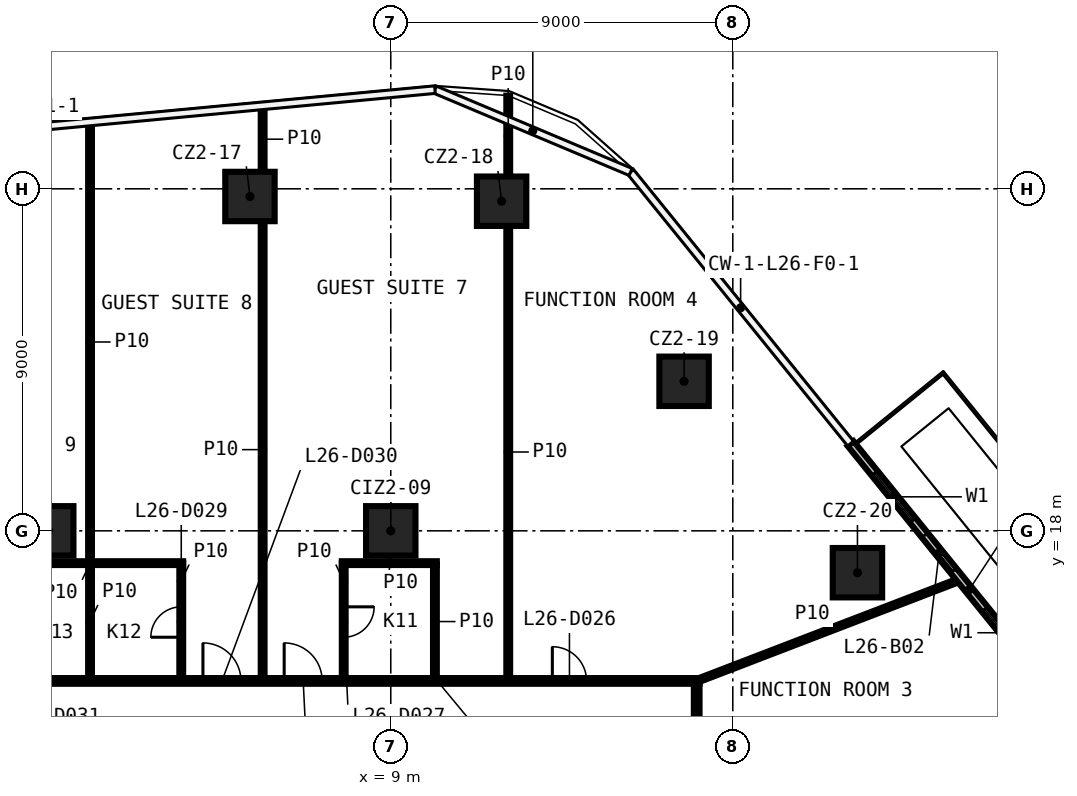
"""IFC4 building model, lengths in metres.
Left out: names, types, materials, properties, quantities, classifications, styles, units other than length and angle.
Written with IfcOpenShell. Run it as: python <this file> out.ifc"""

import sys

from ifc_helpers import new_model, si_unit, direction, frame, frame_2d, origin, origin_2d, place, context, subcontext, project, spatial, rectangle, extrude, element, fill, save


model = new_model("IFC4")
c1 = context("Model", 3, precision=1e-05, world=origin(), true_north=direction((0.0, 1.0)))
c2 = subcontext(c1, "Body", "Model", "MODEL_VIEW")
j1 = project(units=[si_unit("LENGTHUNIT", "METRE"), si_unit("PLANEANGLEUNIT", "RADIAN")], contexts=[c1])
p1 = place(None, origin())
s1 = spatial("IfcSite", under=j1, at=p1, CompositionType="ELEMENT")
p2 = place(p1, origin())
s2 = spatial("IfcBuilding", under=s1, at=p2, CompositionType="ELEMENT")
p3 = place(p2, frame((0.0, 0.0, 121.1)))
s3 = spatial("IfcBuildingStorey", under=s2, at=p3, CompositionType="ELEMENT", Elevation=121.1)
for number, where, z_axis, x_axis in (
    (1, (5.295, 26.798, 0.0), (0.0, 0.0, 1.0), (1.0, 0.0, 0.0)),
    (2, (11.917, 26.674, 0.0), (0.0, 0.0, 1.0), (1.0, 0.0, 0.0)),
    (3, (16.718, 21.935, 0.0), (0.0, 0.0, 1.0), (1.0, 0.0, 0.0)),
    (4, (21.28, 16.898, 0.0), (0.0, 0.0, 1.0), (1.0, 0.0, 0.0)),
    (5, (0.0, 18.0, 0.0), (0.0, 0.0, 1.0), (1.0, 0.0, 0.0)),
    (6, (9.0, 18.0, 0.0), (0.0, 0.0, 1.0), (1.0, 0.0, 0.0)),
):
    element("IfcColumn", number, at=place(p3, frame(where, z_axis=z_axis, x_axis=x_axis)), inside=s3, PredefinedType="COLUMN", context=c2, shape_type="SweptSolid", body=[
        extrude(rectangle(XDim=1.3, YDim=1.3, at=origin_2d()), origin(), (0.0, 0.0, 1.0), 3.3),
    ])
p4 = place(p3, frame((-17.125, 14.05, 0.0), z_axis=(0.0, 0.0, 1.0), x_axis=(1.0, 0.0, 0.0)))
e7 = element("IfcWall", 7, at=p4, inside=s3, PredefinedType="PARTITIONING", context=c2, shape_type="SweptSolid", body=[
    extrude(rectangle(XDim=34.25, YDim=0.15, at=frame_2d((17.125, 0.0))), origin(), (0.0, 0.0, 1.0), 3.3),
])
p5 = place(p4, frame((30.377, 0.0, 0.0)))
e8 = element("IfcOpeningElement", 8, at=p5, cuts=e7, PredefinedType="OPENING", context=c2, shape_type="SweptSolid", body=[
    extrude(rectangle(XDim=0.9, YDim=2.1, at=frame_2d((0.45, 1.05))), frame((0.0, 0.085, 0.0), z_axis=(0.0, -1.0, 0.0), x_axis=(1.0, 0.0, 0.0)), (0.0, 0.0, 1.0), 0.17),
])
p6 = place(p4, frame((23.321, 0.0, 0.0)))
e9 = element("IfcOpeningElement", 9, at=p6, cuts=e7, PredefinedType="OPENING", context=c2, shape_type="SweptSolid", body=[
    extrude(rectangle(XDim=1.0, YDim=2.1, at=frame_2d((0.5, 1.05))), frame((0.0, 0.085, 0.0), z_axis=(0.0, -1.0, 0.0), x_axis=(1.0, 0.0, 0.0)), (0.0, 0.0, 1.0), 0.17),
])
p7 = place(p4, frame((21.183, 0.0, 0.0)))
e10 = element("IfcOpeningElement", 10, at=p7, cuts=e7, PredefinedType="OPENING", context=c2, shape_type="SweptSolid", body=[
    extrude(rectangle(XDim=1.0, YDim=2.1, at=frame_2d((0.5, 1.05))), frame((0.0, 0.085, 0.0), z_axis=(0.0, -1.0, 0.0), x_axis=(1.0, 0.0, 0.0)), (0.0, 0.0, 1.0), 0.17),
])
p8 = place(p4, frame((14.241, 0.0, 0.0)))
e11 = element("IfcOpeningElement", 11, at=p8, cuts=e7, PredefinedType="OPENING", context=c2, shape_type="SweptSolid", body=[
    extrude(rectangle(XDim=1.0, YDim=2.1, at=frame_2d((0.5, 1.05))), frame((0.0, 0.085, 0.0), z_axis=(0.0, -1.0, 0.0), x_axis=(1.0, 0.0, 0.0)), (0.0, 0.0, 1.0), 0.17),
])
p9 = place(p4, frame((12.099, 0.0, 0.0)))
e12 = element("IfcOpeningElement", 12, at=p9, cuts=e7, PredefinedType="OPENING", context=c2, shape_type="SweptSolid", body=[
    extrude(rectangle(XDim=1.0, YDim=2.1, at=frame_2d((0.5, 1.05))), frame((0.0, 0.085, 0.0), z_axis=(0.0, -1.0, 0.0), x_axis=(1.0, 0.0, 0.0)), (0.0, 0.0, 1.0), 0.17),
])
p10 = place(p4, frame((5.161, 0.0, 0.0)))
e13 = element("IfcOpeningElement", 13, at=p10, cuts=e7, PredefinedType="OPENING", context=c2, shape_type="SweptSolid", body=[
    extrude(rectangle(XDim=1.0, YDim=2.1, at=frame_2d((0.5, 1.05))), frame((0.0, 0.085, 0.0), z_axis=(0.0, -1.0, 0.0), x_axis=(1.0, 0.0, 0.0)), (0.0, 0.0, 1.0), 0.17),
])
p11 = place(p4, frame((2.406, 0.0, 0.0)))
e14 = element("IfcOpeningElement", 14, at=p11, cuts=e7, PredefinedType="OPENING", context=c2, shape_type="SweptSolid", body=[
    extrude(rectangle(XDim=0.9, YDim=2.1, at=frame_2d((0.45, 1.05))), frame((0.0, 0.085, 0.0), z_axis=(0.0, -1.0, 0.0), x_axis=(1.0, 0.0, 0.0)), (0.0, 0.0, 1.0), 0.17),
])
p12 = place(p3, frame((-1.363, 17.15, 0.0), z_axis=(0.0, 0.0, 1.0), x_axis=(1.0, 0.0, 0.0)))
e15 = element("IfcWall", 15, at=p12, inside=s3, PredefinedType="PARTITIONING", context=c2, shape_type="SweptSolid", body=[
    extrude(rectangle(XDim=4.9, YDim=0.1, at=frame_2d((2.45, 0.0))), origin(), (0.0, 0.0, 1.0), 3.3),
])
p13 = place(p3, frame((7.712, 17.15, 0.0), z_axis=(0.0, 0.0, 1.0), x_axis=(1.0, 0.0, 0.0)))
e16 = element("IfcWall", 16, at=p13, inside=s3, PredefinedType="PARTITIONING", context=c2, shape_type="SweptSolid", body=[
    extrude(rectangle(XDim=2.5, YDim=0.1, at=frame_2d((1.25, 0.0))), origin(), (0.0, 0.0, 1.0), 3.3),
])
p14 = place(p3, frame((17.05, 14.05, 0.0), z_axis=(0.0, 0.0, 1.0), x_axis=(0.933461735893, 0.358676996228, 0.0)))
e17 = element("IfcWall", 17, at=p14, inside=s3, PredefinedType="PARTITIONING", context=c2, shape_type="SweptSolid", body=[
    extrude(rectangle(XDim=7.42, YDim=0.1, at=frame_2d((3.71, 0.0))), origin(), (0.0, 0.0, 1.0), 3.3),
])
p15 = place(p3, frame((17.05, 13.975, 0.0), z_axis=(0.0, 0.0, 1.0), x_axis=(0.0, -1.0, 0.0)))
e18 = element("IfcWall", 18, at=p15, inside=s3, PredefinedType="PARTITIONING", context=c2, shape_type="SweptSolid", body=[
    extrude(rectangle(XDim=27.95, YDim=0.15, at=frame_2d((13.975, 0.0))), origin(), (0.0, 0.0, 1.0), 3.3),
])
p16 = place(p15, frame((25.545, 0.0, 0.0)))
e19 = element("IfcOpeningElement", 19, at=p16, cuts=e18, PredefinedType="OPENING", context=c2, shape_type="SweptSolid", body=[
    extrude(rectangle(XDim=1.0, YDim=2.1, at=frame_2d((0.5, 1.05))), frame((0.0, 0.085, 0.0), z_axis=(0.0, -1.0, 0.0), x_axis=(1.0, 0.0, 0.0)), (0.0, 0.0, 1.0), 0.17),
])
p17 = place(p15, frame((19.024, 0.0, 0.0)))
e20 = element("IfcOpeningElement", 20, at=p17, cuts=e18, PredefinedType="OPENING", context=c2, shape_type="SweptSolid", body=[
    extrude(rectangle(XDim=1.0, YDim=2.1, at=frame_2d((0.5, 1.05))), frame((0.0, 0.085, 0.0), z_axis=(0.0, -1.0, 0.0), x_axis=(1.0, 0.0, 0.0)), (0.0, 0.0, 1.0), 0.17),
])
p18 = place(p15, frame((17.303, 0.0, 0.0)))
e21 = element("IfcOpeningElement", 21, at=p18, cuts=e18, PredefinedType="OPENING", context=c2, shape_type="SweptSolid", body=[
    extrude(rectangle(XDim=1.0, YDim=2.1, at=frame_2d((0.5, 1.05))), frame((0.0, 0.085, 0.0), z_axis=(0.0, -1.0, 0.0), x_axis=(1.0, 0.0, 0.0)), (0.0, 0.0, 1.0), 0.17),
])
p19 = place(p15, frame((11.155, 0.0, 0.0)))
e22 = element("IfcOpeningElement", 22, at=p19, cuts=e18, PredefinedType="OPENING", context=c2, shape_type="SweptSolid", body=[
    extrude(rectangle(XDim=0.9, YDim=2.1, at=frame_2d((0.45, 1.05))), frame((0.0, 0.085, 0.0), z_axis=(0.0, -1.0, 0.0), x_axis=(1.0, 0.0, 0.0)), (0.0, 0.0, 1.0), 0.17),
])
p20 = place(p15, frame((7.145, 0.0, 0.0)))
e23 = element("IfcOpeningElement", 23, at=p20, cuts=e18, PredefinedType="OPENING", context=c2, shape_type="SweptSolid", body=[
    extrude(rectangle(XDim=0.9, YDim=2.1, at=frame_2d((0.45, 1.05))), frame((0.0, 0.085, 0.0), z_axis=(0.0, -1.0, 0.0), x_axis=(1.0, 0.0, 0.0)), (0.0, 0.0, 1.0), 0.17),
])
p21 = place(p15, frame((2.168, 0.0, 0.0)))
e24 = element("IfcOpeningElement", 24, at=p21, cuts=e18, PredefinedType="OPENING", context=c2, shape_type="SweptSolid", body=[
    extrude(rectangle(XDim=0.9, YDim=2.1, at=frame_2d((0.45, 1.05))), frame((0.0, 0.085, 0.0), z_axis=(0.0, -1.0, 0.0), x_axis=(1.0, 0.0, 0.0)), (0.0, 0.0, 1.0), 0.17),
])
p22 = place(p3, frame((12.091, 14.125, 0.0), z_axis=(0.0, 0.0, 1.0), x_axis=(0.0, 1.0, 0.0)))
e25 = element("IfcWall", 25, at=p22, inside=s3, PredefinedType="PARTITIONING", context=c2, shape_type="SweptSolid", body=[
    extrude(rectangle(XDim=11.899, YDim=0.1, at=frame_2d((5.949, 0.0))), origin(), (0.0, 0.0, 1.0), 3.3),
])
p23 = place(p3, frame((12.091, 27.324, 0.0), z_axis=(0.0, 0.0, 1.0), x_axis=(0.0, 1.0, 0.0)))
e26 = element("IfcWall", 26, at=p23, inside=s3, PredefinedType="PARTITIONING", context=c2, shape_type="SweptSolid", body=[
    extrude(rectangle(XDim=2.128, YDim=0.1, at=frame_2d((1.064, 0.0))), origin(), (0.0, 0.0, 1.0), 3.3),
])
p24 = place(p3, frame((10.162, 14.125, 0.0), z_axis=(0.0, 0.0, 1.0), x_axis=(0.0, 1.0, 0.0)))
e27 = element("IfcWall", 27, at=p24, inside=s3, PredefinedType="PARTITIONING", context=c2, shape_type="SweptSolid", body=[
    extrude(rectangle(XDim=2.975, YDim=0.1, at=frame_2d((1.488, 0.0))), origin(), (0.0, 0.0, 1.0), 3.3),
])
p25 = place(p3, frame((7.762, 17.15, 0.0), z_axis=(0.0, 0.0, 1.0), x_axis=(0.0, -1.0, 0.0)))
e28 = element("IfcWall", 28, at=p25, inside=s3, PredefinedType="PARTITIONING", context=c2, shape_type="SweptSolid", body=[
    extrude(rectangle(XDim=3.025, YDim=0.1, at=frame_2d((1.512, 0.0))), origin(), (0.0, 0.0, 1.0), 3.3),
])
p26 = place(p25, frame((1.15, 0.0, 0.0)))
e29 = element("IfcOpeningElement", 29, at=p26, cuts=e28, PredefinedType="OPENING", context=c2, shape_type="SweptSolid", body=[
    extrude(rectangle(XDim=0.8, YDim=2.1, at=frame_2d((0.4, 1.05))), frame((0.0, 0.06, 0.0), z_axis=(0.0, -1.0, 0.0), x_axis=(1.0, 0.0, 0.0)), (0.0, 0.0, 1.0), 0.12),
])
p27 = place(p3, frame((5.629, 14.125, 0.0), z_axis=(0.0, 0.0, 1.0), x_axis=(0.0, 1.0, 0.0)))
e30 = element("IfcWall", 30, at=p27, inside=s3, PredefinedType="PARTITIONING", context=c2, shape_type="SweptSolid", body=[
    extrude(rectangle(XDim=12.023, YDim=0.1, at=frame_2d((6.011, 0.0))), origin(), (0.0, 0.0, 1.0), 3.3),
])
p28 = place(p3, frame((5.629, 27.448, 0.0), z_axis=(0.0, 0.0, 1.0), x_axis=(0.0, 1.0, 0.0)))
e31 = element("IfcWall", 31, at=p28, inside=s3, PredefinedType="PARTITIONING", context=c2, shape_type="SweptSolid", body=[
    extrude(rectangle(XDim=1.717, YDim=0.1, at=frame_2d((0.858, 0.0))), origin(), (0.0, 0.0, 1.0), 3.3),
])
p29 = place(p3, frame((3.487, 14.125, 0.0), z_axis=(0.0, 0.0, 1.0), x_axis=(0.0, 1.0, 0.0)))
e32 = element("IfcWall", 32, at=p29, inside=s3, PredefinedType="PARTITIONING", context=c2, shape_type="SweptSolid", body=[
    extrude(rectangle(XDim=3.025, YDim=0.1, at=frame_2d((1.512, 0.0))), origin(), (0.0, 0.0, 1.0), 3.3),
])
p30 = place(p29, frame((1.075, 0.0, 0.0)))
e33 = element("IfcOpeningElement", 33, at=p30, cuts=e32, PredefinedType="OPENING", context=c2, shape_type="SweptSolid", body=[
    extrude(rectangle(XDim=0.8, YDim=2.1, at=frame_2d((0.4, 1.05))), frame((0.0, 0.06, 0.0), z_axis=(0.0, -1.0, 0.0), x_axis=(1.0, 0.0, 0.0)), (0.0, 0.0, 1.0), 0.12),
])
p31 = place(p3, frame((1.087, 14.125, 0.0), z_axis=(0.0, 0.0, 1.0), x_axis=(0.0, 1.0, 0.0)))
e34 = element("IfcWall", 34, at=p31, inside=s3, PredefinedType="PARTITIONING", context=c2, shape_type="SweptSolid", body=[
    extrude(rectangle(XDim=2.975, YDim=0.1, at=frame_2d((1.488, 0.0))), origin(), (0.0, 0.0, 1.0), 3.3),
])
p32 = place(p3, frame((1.087, 17.2, 0.0), z_axis=(0.0, 0.0, 1.0), x_axis=(0.0, 1.0, 0.0)))
e35 = element("IfcWall", 35, at=p32, inside=s3, PredefinedType="PARTITIONING", context=c2, shape_type="SweptSolid", body=[
    extrude(rectangle(XDim=11.539, YDim=0.1, at=frame_2d((5.77, 0.0))), origin(), (0.0, 0.0, 1.0), 3.3),
])
p33 = place(p3, frame((26.892, 13.142, 0.0), z_axis=(0.0, 0.0, 1.0), x_axis=(-0.629299699172, 0.777162716953, 0.0)))
e36 = element("IfcWall", 36, at=p33, inside=s3, PredefinedType="SOLIDWALL", context=c2, shape_type="SweptSolid", body=[
    extrude(rectangle(XDim=9.205, YDim=0.2, at=frame_2d((4.603, 0.0))), origin(), (0.0, 0.0, 1.0), 3.3),
])
p34 = place(p33, frame((2.0, 0.0, 0.6)))
e37 = element("IfcOpeningElement", 37, at=p34, cuts=e36, PredefinedType="OPENING", context=c2, shape_type="SweptSolid", body=[
    extrude(rectangle(XDim=1.6, YDim=2.4, at=frame_2d((0.8, 1.2))), frame((0.0, 0.11, 0.0), z_axis=(0.0, -1.0, 0.0), x_axis=(1.0, 0.0, 0.0)), (0.0, 0.0, 1.0), 0.22),
])
p35 = place(p33, frame((0.5, 0.0, 0.0)))
e38 = element("IfcOpeningElement", 38, at=p35, cuts=e36, PredefinedType="OPENING", context=c2, shape_type="SweptSolid", body=[
    extrude(rectangle(XDim=1.2, YDim=2.4, at=frame_2d((0.6, 1.2))), frame((0.0, 0.11, 0.0), z_axis=(0.0, -1.0, 0.0), x_axis=(1.0, 0.0, 0.0)), (0.0, 0.0, 1.0), 0.22),
])
p36 = place(p33, frame((6.603, 0.0, 0.6)))
e39 = element("IfcOpeningElement", 39, at=p36, cuts=e36, PredefinedType="OPENING", context=c2, shape_type="SweptSolid", body=[
    extrude(rectangle(XDim=1.6, YDim=2.4, at=frame_2d((0.8, 1.2))), frame((0.0, 0.11, 0.0), z_axis=(0.0, -1.0, 0.0), x_axis=(1.0, 0.0, 0.0)), (0.0, 0.0, 1.0), 0.22),
])
p37 = place(p33, frame((4.903, 0.0, 0.0)))
e40 = element("IfcOpeningElement", 40, at=p37, cuts=e36, PredefinedType="OPENING", context=c2, shape_type="SweptSolid", body=[
    extrude(rectangle(XDim=1.2, YDim=2.4, at=frame_2d((0.6, 1.2))), frame((0.0, 0.11, 0.0), z_axis=(0.0, -1.0, 0.0), x_axis=(1.0, 0.0, 0.0)), (0.0, 0.0, 1.0), 0.22),
])
p38 = place(p5, origin())
e41 = element("IfcDoor", 41, at=p38, inside=s3, OperationType="SINGLE_SWING_LEFT", PredefinedType="DOOR", context=c2, shape_type="SweptSolid", body=[
    extrude(rectangle(XDim=0.9, YDim=2.1, at=frame_2d((0.45, 1.05))), frame((0.0, 0.025, 0.0), z_axis=(0.0, -1.0, 0.0), x_axis=(1.0, 0.0, 0.0)), (0.0, 0.0, 1.0), 0.05),
])
fill(e8, e41)
p39 = place(p26, origin())
e42 = element("IfcDoor", 42, at=p39, inside=s3, OperationType="SINGLE_SWING_LEFT", PredefinedType="DOOR", context=c2, shape_type="SweptSolid", body=[
    extrude(rectangle(XDim=0.8, YDim=2.1, at=frame_2d((0.4, 1.05))), frame((0.0, 0.025, 0.0), z_axis=(0.0, -1.0, 0.0), x_axis=(1.0, 0.0, 0.0)), (0.0, 0.0, 1.0), 0.05),
])
fill(e29, e42)
p40 = place(p6, origin())
e43 = element("IfcDoor", 43, at=p40, inside=s3, OperationType="SINGLE_SWING_RIGHT", PredefinedType="DOOR", context=c2, shape_type="SweptSolid", body=[
    extrude(rectangle(XDim=1.0, YDim=2.1, at=frame_2d((0.5, 1.05))), frame((0.0, 0.025, 0.0), z_axis=(0.0, -1.0, 0.0), x_axis=(1.0, 0.0, 0.0)), (0.0, 0.0, 1.0), 0.05),
])
fill(e9, e43)
p41 = place(p30, origin())
e44 = element("IfcDoor", 44, at=p41, inside=s3, OperationType="SINGLE_SWING_RIGHT", PredefinedType="DOOR", context=c2, shape_type="SweptSolid", body=[
    extrude(rectangle(XDim=0.8, YDim=2.1, at=frame_2d((0.4, 1.05))), frame((0.0, 0.025, 0.0), z_axis=(0.0, -1.0, 0.0), x_axis=(1.0, 0.0, 0.0)), (0.0, 0.0, 1.0), 0.05),
])
fill(e33, e44)
p42 = place(p7, origin())
e45 = element("IfcDoor", 45, at=p42, inside=s3, OperationType="SINGLE_SWING_LEFT", PredefinedType="DOOR", context=c2, shape_type="SweptSolid", body=[
    extrude(rectangle(XDim=1.0, YDim=2.1, at=frame_2d((0.5, 1.05))), frame((0.0, 0.025, 0.0), z_axis=(0.0, -1.0, 0.0), x_axis=(1.0, 0.0, 0.0)), (0.0, 0.0, 1.0), 0.05),
])
fill(e10, e45)
p43 = place(p34, origin())
e46 = element("IfcWindow", 46, at=p43, inside=s3, PartitioningType="SINGLE_PANEL", PredefinedType="WINDOW", context=c2, shape_type="SweptSolid", body=[
    extrude(rectangle(XDim=1.6, YDim=2.4, at=frame_2d((0.8, 1.2))), frame((0.0, 0.03, 0.0), z_axis=(0.0, -1.0, 0.0), x_axis=(1.0, 0.0, 0.0)), (0.0, 0.0, 1.0), 0.06),
])
fill(e37, e46)
p44 = place(p36, origin())
e47 = element("IfcWindow", 47, at=p44, inside=s3, PartitioningType="SINGLE_PANEL", PredefinedType="WINDOW", context=c2, shape_type="SweptSolid", body=[
    extrude(rectangle(XDim=1.6, YDim=2.4, at=frame_2d((0.8, 1.2))), frame((0.0, 0.03, 0.0), z_axis=(0.0, -1.0, 0.0), x_axis=(1.0, 0.0, 0.0)), (0.0, 0.0, 1.0), 0.06),
])
fill(e39, e47)
p45 = place(p37, origin())
e48 = element("IfcDoor", 48, at=p45, inside=s3, OperationType="SLIDING_TO_LEFT", PredefinedType="DOOR", context=c2, shape_type="SweptSolid", body=[
    extrude(rectangle(XDim=1.2, YDim=2.4, at=frame_2d((0.6, 1.2))), frame((0.0, 0.025, 0.0), z_axis=(0.0, -1.0, 0.0), x_axis=(1.0, 0.0, 0.0)), (0.0, 0.0, 1.0), 0.05),
])
fill(e40, e48)
save(model, sys.argv[1])
